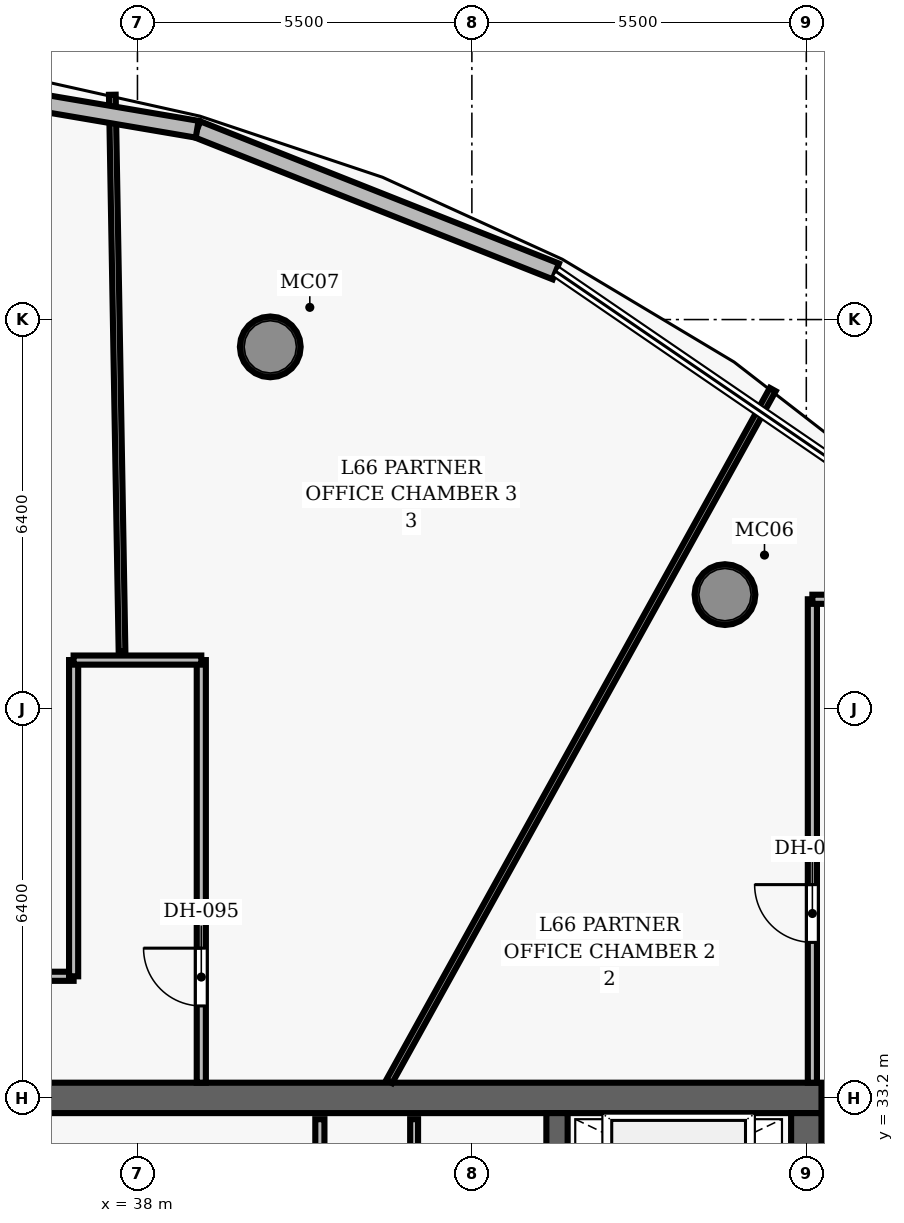
"""IFC4 building model, lengths in metres.
Left out: names, types, materials, properties, quantities, classifications, styles, units other than length and angle.
Written with IfcOpenShell. Run it as: python <this file> out.ifc"""

import sys

from ifc_helpers import new_model, si_unit, direction, frame, frame_2d, origin, origin_2d, place, context, subcontext, project, spatial, rectangle, hollow_circle, extrude, element, fill, save


model = new_model("IFC4")
c1 = context("Model", 3, precision=1e-05, world=origin(), true_north=direction((0.0, 1.0)))
c2 = subcontext(c1, "Body", "Model", "MODEL_VIEW")
j1 = project(units=[si_unit("LENGTHUNIT", "METRE"), si_unit("PLANEANGLEUNIT", "RADIAN")], contexts=[c1])
p1 = place(None, origin())
s1 = spatial("IfcSite", under=j1, at=p1, CompositionType="ELEMENT")
p2 = place(p1, origin())
s2 = spatial("IfcBuilding", under=s1, at=p2, CompositionType="ELEMENT")
p3 = place(p2, frame((0.0, 0.0, 261.3)))
s3 = spatial("IfcBuildingStorey", under=s2, at=p3, CompositionType="ELEMENT", Elevation=261.3)
p4 = place(p3, frame((26.75, 33.2, 0.0), z_axis=(0.0, 0.0, 1.0), x_axis=(1.0, 0.0, 0.0)))
e1 = element("IfcWall", 1, at=p4, inside=s3, PredefinedType="SHEAR", context=c2, shape_type="SweptSolid", body=[
    extrude(rectangle(XDim=22.5, YDim=0.5, at=frame_2d((11.25, 0.0))), origin(), (0.0, 0.0, 1.0), 3.85),
])
p5 = place(p3, frame((49.0, 19.05, 0.0), z_axis=(0.0, 0.0, 1.0), x_axis=(0.0, 1.0, 0.0)))
e2 = element("IfcWall", 2, at=p5, inside=s3, PredefinedType="SHEAR", context=c2, shape_type="SweptSolid", body=[
    extrude(rectangle(XDim=13.9, YDim=0.5, at=frame_2d((6.95, 0.0))), origin(), (0.0, 0.0, 1.0), 3.85),
])
p6 = place(p5, frame((8.2, 0.0, 0.0)))
e3 = element("IfcOpeningElement", 3, at=p6, cuts=e2, PredefinedType="OPENING", context=c2, shape_type="SweptSolid", body=[
    extrude(rectangle(XDim=1.05, YDim=2.15, at=frame_2d((0.525, 1.075))), frame((0.0, 0.26, 0.0), z_axis=(0.0, -1.0, 0.0), x_axis=(1.0, 0.0, 0.0)), (0.0, 0.0, 1.0), 0.52),
])
p7 = place(p3, frame((44.9, 19.05, 0.0), z_axis=(0.0, 0.0, 1.0), x_axis=(0.0, 1.0, 0.0)))
e4 = element("IfcWall", 4, at=p7, inside=s3, PredefinedType="SHEAR", context=c2, shape_type="SweptSolid", body=[
    extrude(rectangle(XDim=13.9, YDim=0.35, at=frame_2d((6.95, 0.0))), origin(), (0.0, 0.0, 1.0), 3.85),
])
for number, where, z_axis, x_axis in (
    (5, (47.662, 41.477, 0.0), (0.0, 0.0, 1.0), (1.0, 0.0, 0.0)),
    (6, (40.185, 45.551, 0.0), (0.0, 0.0, 1.0), (1.0, 0.0, 0.0)),
):
    element("IfcColumn", number, at=place(p3, frame(where, z_axis=z_axis, x_axis=x_axis)), inside=s3, PredefinedType="COLUMN", context=c2, shape_type="SweptSolid", body=[
        extrude(hollow_circle(Radius=0.5, WallThickness=0.045, at=origin_2d()), origin(), (0.0, 0.0, 1.0), 3.85),
    ])
p8 = place(p3, frame((41.0, 28.95, 0.0), z_axis=(0.0, 0.0, 1.0), x_axis=(0.0, 1.0, 0.0)))
e7 = element("IfcWall", 7, at=p8, inside=s3, PredefinedType="PARTITIONING", context=c2, shape_type="SweptSolid", body=[
    extrude(rectangle(XDim=3.9, YDim=0.15, at=frame_2d((1.95, 0.0))), origin(), (0.0, 0.0, 1.0), 3.04),
])
p9 = place(p8, frame((0.7, 0.0, 0.0)))
e8 = element("IfcOpeningElement", 8, at=p9, cuts=e7, PredefinedType="OPENING", context=c2, shape_type="SweptSolid", body=[
    extrude(rectangle(XDim=0.85, YDim=2.1, at=frame_2d((0.425, 1.05))), frame((0.0, 0.085, 0.0), z_axis=(0.0, -1.0, 0.0), x_axis=(1.0, 0.0, 0.0)), (0.0, 0.0, 1.0), 0.17),
])
p10 = place(p3, frame((42.55, 28.1, 0.0), z_axis=(0.0, 0.0, 1.0), x_axis=(0.0, 1.0, 0.0)))
e9 = element("IfcWall", 9, at=p10, inside=s3, PredefinedType="PARTITIONING", context=c2, shape_type="SweptSolid", body=[
    extrude(rectangle(XDim=4.75, YDim=0.13, at=frame_2d((2.375, 0.0))), origin(), (0.0, 0.0, 1.0), 3.04),
])
p11 = place(p10, frame((1.4, 0.0, 0.0)))
e10 = element("IfcOpeningElement", 10, at=p11, cuts=e9, PredefinedType="OPENING", context=c2, shape_type="SweptSolid", body=[
    extrude(rectangle(XDim=0.85, YDim=2.1, at=frame_2d((0.425, 1.05))), frame((0.0, 0.075, 0.0), z_axis=(0.0, -1.0, 0.0), x_axis=(1.0, 0.0, 0.0)), (0.0, 0.0, 1.0), 0.15),
])
p12 = place(p3, frame((26.9, 35.2, 0.0), z_axis=(0.0, 0.0, 1.0), x_axis=(1.0, 0.0, 0.0)))
e11 = element("IfcWall", 11, at=p12, inside=s3, PredefinedType="PARTITIONING", context=c2, shape_type="SweptSolid", body=[
    extrude(rectangle(XDim=10.05, YDim=0.15, at=frame_2d((5.025, 0.0))), origin(), (0.0, 0.0, 1.0), 3.04),
])
p13 = place(p12, frame((6.422, 0.0, 0.0)))
e12 = element("IfcOpeningElement", 12, at=p13, cuts=e11, PredefinedType="OPENING", context=c2, shape_type="SweptSolid", body=[
    extrude(rectangle(XDim=0.95, YDim=2.15, at=frame_2d((0.475, 1.075))), frame((0.0, 0.085, 0.0), z_axis=(0.0, -1.0, 0.0), x_axis=(1.0, 0.0, 0.0)), (0.0, 0.0, 1.0), 0.17),
])
p14 = place(p12, frame((3.872, 0.0, 0.0)))
e13 = element("IfcOpeningElement", 13, at=p14, cuts=e11, PredefinedType="OPENING", context=c2, shape_type="SweptSolid", body=[
    extrude(rectangle(XDim=0.95, YDim=2.15, at=frame_2d((0.475, 1.075))), frame((0.0, 0.085, 0.0), z_axis=(0.0, -1.0, 0.0), x_axis=(1.0, 0.0, 0.0)), (0.0, 0.0, 1.0), 0.17),
])
p15 = place(p3, frame((49.1, 33.45, 0.0), z_axis=(0.0, 0.0, 1.0), x_axis=(0.0, 1.0, 0.0)))
e14 = element("IfcWall", 14, at=p15, inside=s3, PredefinedType="PARTITIONING", context=c2, shape_type="SweptSolid", body=[
    extrude(rectangle(XDim=7.95, YDim=0.15, at=frame_2d((3.975, 0.0))), origin(), (0.0, 0.0, 1.0), 3.04),
])
p16 = place(p15, frame((2.308, 0.0, 0.0)))
e15 = element("IfcOpeningElement", 15, at=p16, cuts=e14, PredefinedType="OPENING", context=c2, shape_type="SweptSolid", body=[
    extrude(rectangle(XDim=0.95, YDim=2.15, at=frame_2d((0.475, 1.075))), frame((0.0, 0.085, 0.0), z_axis=(0.0, -1.0, 0.0), x_axis=(1.0, 0.0, 0.0)), (0.0, 0.0, 1.0), 0.17),
])
p17 = place(p3, frame((49.1, 41.4, 0.0), z_axis=(0.0, 0.0, 1.0), x_axis=(1.0, 0.0, 0.0)))
e16 = element("IfcWall", 16, at=p17, inside=s3, PredefinedType="PARTITIONING", context=c2, shape_type="SweptSolid", body=[
    extrude(rectangle(XDim=2.1, YDim=0.15, at=frame_2d((1.05, 0.0))), origin(), (0.0, 0.0, 1.0), 3.04),
])
p18 = place(p3, frame((36.95, 35.2, 0.0), z_axis=(0.0, 0.0, 1.0), x_axis=(0.0, 1.0, 0.0)))
e17 = element("IfcWall", 17, at=p18, inside=s3, PredefinedType="PARTITIONING", context=c2, shape_type="SweptSolid", body=[
    extrude(rectangle(XDim=5.2, YDim=0.15, at=frame_2d((2.6, 0.0))), origin(), (0.0, 0.0, 1.0), 3.04),
])
p19 = place(p3, frame((39.05, 33.45, 0.0), z_axis=(0.0, 0.0, 1.0), x_axis=(0.0, 1.0, 0.0)))
e18 = element("IfcWall", 18, at=p19, inside=s3, PredefinedType="PARTITIONING", context=c2, shape_type="SweptSolid", body=[
    extrude(rectangle(XDim=6.95, YDim=0.15, at=frame_2d((3.475, 0.0))), origin(), (0.0, 0.0, 1.0), 3.04),
])
p20 = place(p19, frame((1.262, 0.0, 0.0)))
e19 = element("IfcOpeningElement", 19, at=p20, cuts=e18, PredefinedType="OPENING", context=c2, shape_type="SweptSolid", body=[
    extrude(rectangle(XDim=0.95, YDim=2.15, at=frame_2d((0.475, 1.075))), frame((0.0, 0.085, 0.0), z_axis=(0.0, -1.0, 0.0), x_axis=(1.0, 0.0, 0.0)), (0.0, 0.0, 1.0), 0.17),
])
p21 = place(p3, frame((36.95, 40.4, 0.0), z_axis=(0.0, 0.0, 1.0), x_axis=(1.0, 0.0, 0.0)))
e20 = element("IfcWall", 20, at=p21, inside=s3, PredefinedType="PARTITIONING", context=c2, shape_type="SweptSolid", body=[
    extrude(rectangle(XDim=2.1, YDim=0.15, at=frame_2d((1.05, 0.0))), origin(), (0.0, 0.0, 1.0), 3.04),
])
p22 = place(p3, frame((42.141, 33.47, 0.0), z_axis=(0.0, 0.0, 1.0), x_axis=(0.484812626369, 0.874618040812, 0.0)))
e21 = element("IfcWall", 21, at=p22, inside=s3, PredefinedType="PARTITIONING", context=c2, shape_type="SweptSolid", body=[
    extrude(rectangle(XDim=13.01, YDim=0.11, at=frame_2d((6.505, 0.0))), origin(), (0.0, 0.0, 1.0), 3.04),
])
p23 = place(p3, frame((37.746, 40.54, 0.0), z_axis=(0.0, 0.0, 1.0), x_axis=(-0.01743409501, 0.999848014616, 0.0)))
e22 = element("IfcWall", 22, at=p23, inside=s3, PredefinedType="PARTITIONING", context=c2, shape_type="SweptSolid", body=[
    extrude(rectangle(XDim=9.158, YDim=0.11, at=frame_2d((4.579, 0.0))), origin(), (0.0, 0.0, 1.0), 3.04),
])
p24 = place(p3, frame((38.982, 49.13, 0.0), z_axis=(0.0, 0.0, 1.0), x_axis=(0.929631768462, -0.36848985748, 0.0)))
e23 = element("IfcWall", 23, at=p24, inside=s3, PredefinedType="SOLIDWALL", context=c2, shape_type="SweptSolid", body=[
    extrude(rectangle(XDim=6.345, YDim=0.28, at=frame_2d((3.173, 0.0))), origin(), (0.0, 0.0, 1.0), 3.625),
])
p25 = place(p3, frame((33.205, 50.112, 0.0), z_axis=(0.0, 0.0, 1.0), x_axis=(0.985868784633, -0.167519370479, 0.0)))
e24 = element("IfcWall", 24, at=p25, inside=s3, PredefinedType="SOLIDWALL", context=c2, shape_type="SweptSolid", body=[
    extrude(rectangle(XDim=5.86, YDim=0.28, at=frame_2d((2.93, 0.0))), origin(), (0.0, 0.0, 1.0), 3.625),
])
p26 = place(p16, origin())
e25 = element("IfcDoor", 25, at=p26, inside=s3, OperationType="SINGLE_SWING_RIGHT", PredefinedType="DOOR", context=c2, shape_type="SweptSolid", body=[
    extrude(rectangle(XDim=0.95, YDim=2.15, at=frame_2d((0.475, 1.075))), frame((0.0, 0.025, 0.0), z_axis=(0.0, -1.0, 0.0), x_axis=(1.0, 0.0, 0.0)), (0.0, 0.0, 1.0), 0.05),
])
fill(e15, e25)
p27 = place(p20, origin())
e26 = element("IfcDoor", 26, at=p27, inside=s3, OperationType="SINGLE_SWING_RIGHT", PredefinedType="DOOR", context=c2, shape_type="SweptSolid", body=[
    extrude(rectangle(XDim=0.95, YDim=2.15, at=frame_2d((0.475, 1.075))), frame((0.0, 0.025, 0.0), z_axis=(0.0, -1.0, 0.0), x_axis=(1.0, 0.0, 0.0)), (0.0, 0.0, 1.0), 0.05),
])
fill(e19, e26)
save(model, sys.argv[1])
